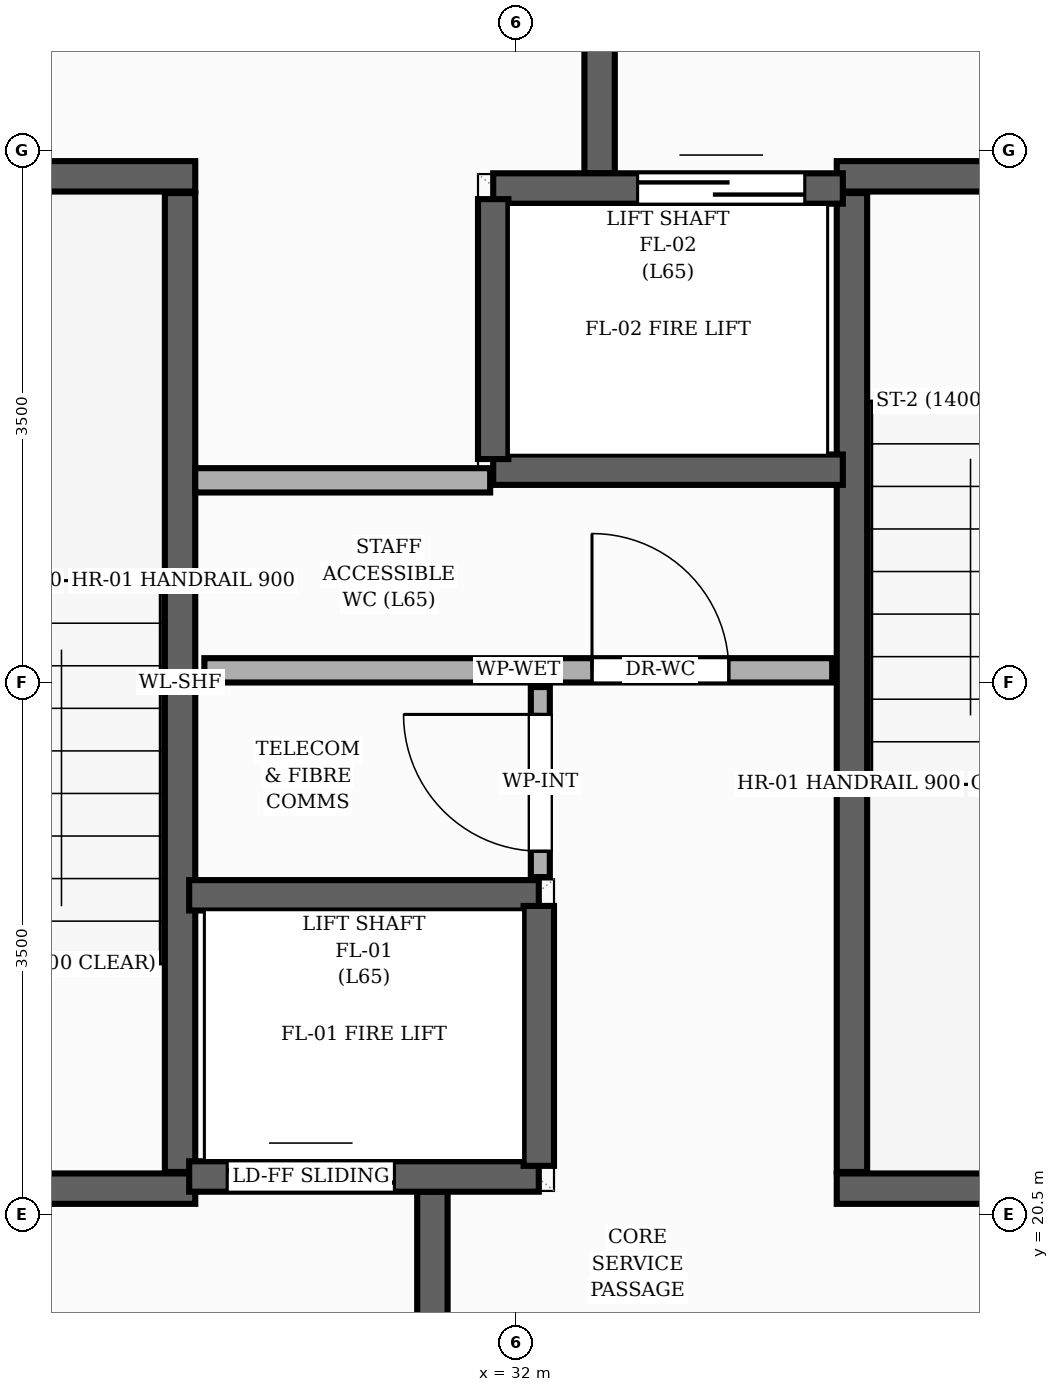
"""IFC4 building model, lengths in metres.
Left out: names, types, materials, properties, quantities, classifications, styles, units other than length and angle.
Written with IfcOpenShell. Run it as: python <this file> out.ifc"""

import sys

from ifc_helpers import new_model, si_unit, direction, frame, frame_2d, origin, place, context, subcontext, project, spatial, rectangle, extrude, element, fill, save


model = new_model("IFC4")
c1 = context("Model", 3, precision=1e-05, world=origin(), true_north=direction((0.0, 1.0)))
c2 = subcontext(c1, "Body", "Model", "MODEL_VIEW")
j1 = project(units=[si_unit("LENGTHUNIT", "METRE"), si_unit("PLANEANGLEUNIT", "RADIAN")], contexts=[c1])
p1 = place(None, origin())
s1 = spatial("IfcSite", under=j1, at=p1, CompositionType="ELEMENT")
p2 = place(p1, origin())
s2 = spatial("IfcBuilding", under=s1, at=p2, CompositionType="ELEMENT")
p3 = place(p2, frame((0.0, 0.0, 214.24)))
s3 = spatial("IfcBuildingStorey", under=s2, at=p3, CompositionType="ELEMENT", Elevation=214.24)
p4 = place(p3, frame((29.79, 20.78, 0.0), z_axis=(0.0, 0.0, 1.0), x_axis=(0.0, 1.0, 0.0)))
e1 = element("IfcWall", 1, at=p4, inside=s3, PredefinedType="SHEAR", context=c2, shape_type="SweptSolid", body=[
    extrude(rectangle(XDim=6.44, YDim=0.2, at=frame_2d((3.22, 0.0))), origin(), (0.0, 0.0, 1.0), 3.2),
])
p5 = place(p3, frame((26.65, 27.33, 0.0), z_axis=(0.0, 0.0, 1.0), x_axis=(1.0, 0.0, 0.0)))
e2 = element("IfcWall", 2, at=p5, inside=s3, PredefinedType="SHEAR", context=c2, shape_type="SweptSolid", body=[
    extrude(rectangle(XDim=3.24, YDim=0.2, at=frame_2d((1.62, 0.0))), origin(), (0.0, 0.0, 1.0), 3.2),
])
p6 = place(p3, frame((26.65, 20.67, 0.0), z_axis=(0.0, 0.0, 1.0), x_axis=(1.0, 0.0, 0.0)))
e3 = element("IfcWall", 3, at=p6, inside=s3, PredefinedType="SHEAR", context=c2, shape_type="SweptSolid", body=[
    extrude(rectangle(XDim=3.24, YDim=0.2, at=frame_2d((1.62, 0.0))), origin(), (0.0, 0.0, 1.0), 3.2),
])
p7 = place(p6, frame((1.055, 0.0, 0.0)))
e4 = element("IfcOpeningElement", 4, at=p7, cuts=e3, PredefinedType="OPENING", context=c2, shape_type="SweptSolid", body=[
    extrude(rectangle(XDim=1.05, YDim=2.15, at=frame_2d((0.525, 1.075))), frame((0.0, 0.11, 0.0), z_axis=(0.0, -1.0, 0.0), x_axis=(1.0, 0.0, 0.0)), (0.0, 0.0, 1.0), 0.22),
])
p8 = place(p3, frame((34.21, 20.78, 0.0), z_axis=(0.0, 0.0, 1.0), x_axis=(0.0, 1.0, 0.0)))
e5 = element("IfcWall", 5, at=p8, inside=s3, PredefinedType="SHEAR", context=c2, shape_type="SweptSolid", body=[
    extrude(rectangle(XDim=6.44, YDim=0.2, at=frame_2d((3.22, 0.0))), origin(), (0.0, 0.0, 1.0), 3.2),
])
p9 = place(p3, frame((34.11, 20.67, 0.0), z_axis=(0.0, 0.0, 1.0), x_axis=(1.0, 0.0, 0.0)))
e6 = element("IfcWall", 6, at=p9, inside=s3, PredefinedType="SHEAR", context=c2, shape_type="SweptSolid", body=[
    extrude(rectangle(XDim=3.24, YDim=0.2, at=frame_2d((1.62, 0.0))), origin(), (0.0, 0.0, 1.0), 3.2),
])
p10 = place(p3, frame((34.11, 27.33, 0.0), z_axis=(0.0, 0.0, 1.0), x_axis=(1.0, 0.0, 0.0)))
e7 = element("IfcWall", 7, at=p10, inside=s3, PredefinedType="SHEAR", context=c2, shape_type="SweptSolid", body=[
    extrude(rectangle(XDim=3.24, YDim=0.2, at=frame_2d((1.62, 0.0))), origin(), (0.0, 0.0, 1.0), 3.2),
])
p11 = place(p10, frame((1.135, 0.0, 0.0)))
e8 = element("IfcOpeningElement", 8, at=p11, cuts=e7, PredefinedType="OPENING", context=c2, shape_type="SweptSolid", body=[
    extrude(rectangle(XDim=1.05, YDim=2.15, at=frame_2d((0.525, 1.075))), frame((0.0, 0.11, 0.0), z_axis=(0.0, -1.0, 0.0), x_axis=(1.0, 0.0, 0.0)), (0.0, 0.0, 1.0), 0.22),
])
for number, where, z_axis, x_axis in (
    (9, (31.45, 17.15, 0.0), (0.0, 0.0, 1.0), (0.0, 1.0, 0.0)),
    (10, (32.55, 27.35, 0.0), (0.0, 0.0, 1.0), (0.0, 1.0, 0.0)),
):
    element("IfcWall", number, at=place(p3, frame(where, z_axis=z_axis, x_axis=x_axis)), inside=s3, PredefinedType="SHEAR", context=c2, shape_type="SweptSolid", body=[
        extrude(rectangle(XDim=3.5, YDim=0.2, at=frame_2d((1.75, 0.0))), origin(), (0.0, 0.0, 1.0), 3.2),
    ])
p12 = place(p3, frame((29.85, 20.75, 0.0), z_axis=(0.0, 0.0, 1.0), x_axis=(1.0, 0.0, 0.0)))
e11 = element("IfcWall", 11, at=p12, inside=s3, PredefinedType="SHEAR", context=c2, shape_type="SweptSolid", body=[
    extrude(rectangle(XDim=2.3, YDim=0.2, at=frame_2d((1.15, 0.0))), origin(), (0.0, 0.0, 1.0), 3.2),
])
p13 = place(p12, frame((0.25, 0.0, 0.0)))
e12 = element("IfcOpeningElement", 12, at=p13, cuts=e11, PredefinedType="OPENING", context=c2, shape_type="SweptSolid", body=[
    extrude(rectangle(XDim=1.1, YDim=2.15, at=frame_2d((0.55, 1.075))), frame((0.0, 0.11, 0.0), z_axis=(0.0, -1.0, 0.0), x_axis=(1.0, 0.0, 0.0)), (0.0, 0.0, 1.0), 0.22),
])
p14 = place(p3, frame((29.85, 22.6, 0.0), z_axis=(0.0, 0.0, 1.0), x_axis=(1.0, 0.0, 0.0)))
e13 = element("IfcWall", 13, at=p14, inside=s3, PredefinedType="SHEAR", context=c2, shape_type="SweptSolid", body=[
    extrude(rectangle(XDim=2.3, YDim=0.2, at=frame_2d((1.15, 0.0))), origin(), (0.0, 0.0, 1.0), 3.2),
])
p15 = place(p3, frame((32.15, 20.82, 0.0), z_axis=(0.0, 0.0, 1.0), x_axis=(0.0, 1.0, 0.0)))
e14 = element("IfcWall", 14, at=p15, inside=s3, PredefinedType="SHEAR", context=c2, shape_type="SweptSolid", body=[
    extrude(rectangle(XDim=1.71, YDim=0.2, at=frame_2d((0.855, 0.0))), origin(), (0.0, 0.0, 1.0), 3.2),
])
p16 = place(p3, frame((31.85, 27.25, 0.0), z_axis=(0.0, 0.0, 1.0), x_axis=(1.0, 0.0, 0.0)))
e15 = element("IfcWall", 15, at=p16, inside=s3, PredefinedType="SHEAR", context=c2, shape_type="SweptSolid", body=[
    extrude(rectangle(XDim=2.3, YDim=0.2, at=frame_2d((1.15, 0.0))), origin(), (0.0, 0.0, 1.0), 3.2),
])
p17 = place(p16, frame((0.95, 0.0, 0.0)))
e16 = element("IfcOpeningElement", 16, at=p17, cuts=e15, PredefinedType="OPENING", context=c2, shape_type="SweptSolid", body=[
    extrude(rectangle(XDim=1.1, YDim=2.15, at=frame_2d((0.55, 1.075))), frame((0.0, 0.11, 0.0), z_axis=(0.0, -1.0, 0.0), x_axis=(1.0, 0.0, 0.0)), (0.0, 0.0, 1.0), 0.22),
])
p18 = place(p3, frame((31.85, 25.4, 0.0), z_axis=(0.0, 0.0, 1.0), x_axis=(1.0, 0.0, 0.0)))
e17 = element("IfcWall", 17, at=p18, inside=s3, PredefinedType="SHEAR", context=c2, shape_type="SweptSolid", body=[
    extrude(rectangle(XDim=2.3, YDim=0.2, at=frame_2d((1.15, 0.0))), origin(), (0.0, 0.0, 1.0), 3.2),
])
p19 = place(p3, frame((31.85, 25.47, 0.0), z_axis=(0.0, 0.0, 1.0), x_axis=(0.0, 1.0, 0.0)))
e18 = element("IfcWall", 18, at=p19, inside=s3, PredefinedType="SHEAR", context=c2, shape_type="SweptSolid", body=[
    extrude(rectangle(XDim=1.71, YDim=0.2, at=frame_2d((0.855, 0.0))), origin(), (0.0, 0.0, 1.0), 3.2),
])
p20 = place(p3, frame((29.95, 24.08, 0.0), z_axis=(0.0, 0.0, 1.0), x_axis=(1.0, 0.0, 0.0)))
e19 = element("IfcWall", 19, at=p20, inside=s3, PredefinedType="PLUMBINGWALL", context=c2, shape_type="SweptSolid", body=[
    extrude(rectangle(XDim=4.13, YDim=0.16, at=frame_2d((2.065, 0.0))), origin(), (0.0, 0.0, 1.0), 2.955),
])
p21 = place(p20, frame((2.55, 0.0, 0.0)))
e20 = element("IfcOpeningElement", 20, at=p21, cuts=e19, PredefinedType="OPENING", context=c2, shape_type="SweptSolid", body=[
    extrude(rectangle(XDim=0.9, YDim=2.1, at=frame_2d((0.45, 1.05))), frame((0.0, 0.09, 0.0), z_axis=(0.0, -1.0, 0.0), x_axis=(1.0, 0.0, 0.0)), (0.0, 0.0, 1.0), 0.18),
])
p22 = place(p3, frame((32.16, 22.72, 0.0), z_axis=(0.0, 0.0, 1.0), x_axis=(0.0, 1.0, 0.0)))
e21 = element("IfcWall", 21, at=p22, inside=s3, PredefinedType="PARTITIONING", context=c2, shape_type="SweptSolid", body=[
    extrude(rectangle(XDim=1.25, YDim=0.125, at=frame_2d((0.625, 0.0))), origin(), (0.0, 0.0, 1.0), 2.955),
])
p23 = place(p22, frame((0.17, 0.0, 0.0)))
e22 = element("IfcOpeningElement", 22, at=p23, cuts=e21, PredefinedType="OPENING", context=c2, shape_type="SweptSolid", body=[
    extrude(rectangle(XDim=0.9, YDim=2.1, at=frame_2d((0.45, 1.05))), frame((0.0, 0.073, 0.0), z_axis=(0.0, -1.0, 0.0), x_axis=(1.0, 0.0, 0.0)), (0.0, 0.0, 1.0), 0.145),
])
p24 = place(p3, frame((29.89, 25.33, 0.0), z_axis=(0.0, 0.0, 1.0), x_axis=(1.0, 0.0, 0.0)))
e23 = element("IfcWall", 23, at=p24, inside=s3, PredefinedType="PLUMBINGWALL", context=c2, shape_type="SweptSolid", body=[
    extrude(rectangle(XDim=1.94, YDim=0.16, at=frame_2d((0.97, 0.0))), origin(), (0.0, 0.0, 1.0), 2.955),
])
p25 = place(p13, origin())
e24 = element("IfcDoor", 24, at=p25, inside=s3, OperationType="DOUBLE_DOOR_SLIDING", PredefinedType="DOOR", context=c2, shape_type="SweptSolid", body=[
    extrude(rectangle(XDim=1.1, YDim=2.15, at=frame_2d((0.55, 1.075))), frame((0.0, 0.025, 0.0), z_axis=(0.0, -1.0, 0.0), x_axis=(1.0, 0.0, 0.0)), (0.0, 0.0, 1.0), 0.05),
])
fill(e12, e24)
p26 = place(p17, origin())
e25 = element("IfcDoor", 25, at=p26, inside=s3, OperationType="DOUBLE_DOOR_SLIDING", PredefinedType="DOOR", context=c2, shape_type="SweptSolid", body=[
    extrude(rectangle(XDim=1.1, YDim=2.15, at=frame_2d((0.55, 1.075))), frame((0.0, 0.025, 0.0), z_axis=(0.0, -1.0, 0.0), x_axis=(1.0, 0.0, 0.0)), (0.0, 0.0, 1.0), 0.05),
])
fill(e16, e25)
p27 = place(p21, origin())
e26 = element("IfcDoor", 26, at=p27, inside=s3, OperationType="SINGLE_SWING_LEFT", PredefinedType="DOOR", context=c2, shape_type="SweptSolid", body=[
    extrude(rectangle(XDim=0.9, YDim=2.1, at=frame_2d((0.45, 1.05))), frame((0.0, 0.025, 0.0), z_axis=(0.0, -1.0, 0.0), x_axis=(1.0, 0.0, 0.0)), (0.0, 0.0, 1.0), 0.05),
])
fill(e20, e26)
p28 = place(p23, origin())
e27 = element("IfcDoor", 27, at=p28, inside=s3, OperationType="SINGLE_SWING_RIGHT", PredefinedType="DOOR", context=c2, shape_type="SweptSolid", body=[
    extrude(rectangle(XDim=0.9, YDim=2.1, at=frame_2d((0.45, 1.05))), frame((0.0, 0.025, 0.0), z_axis=(0.0, -1.0, 0.0), x_axis=(1.0, 0.0, 0.0)), (0.0, 0.0, 1.0), 0.05),
])
fill(e22, e27)
save(model, sys.argv[1])
